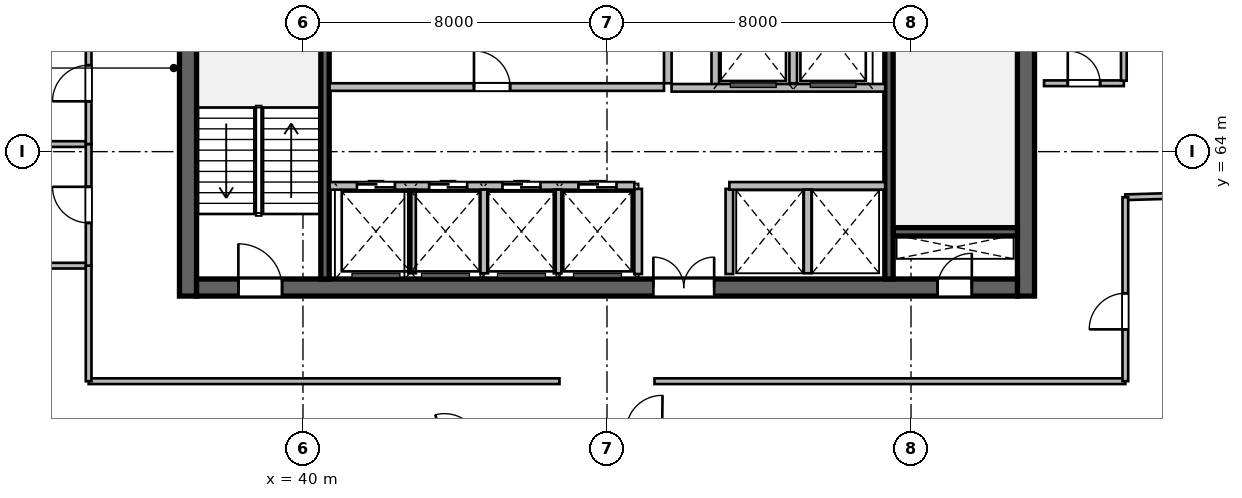
"""IFC4 building model, lengths in metres.
Left out: names, types, materials, properties, quantities, classifications, styles, units other than length and angle.
Written with IfcOpenShell. Run it as: python <this file> out.ifc"""

import sys

from ifc_helpers import new_model, si_unit, direction, frame, frame_2d, origin, place, context, subcontext, project, spatial, rectangle, extrude, source, transform, mapped, element, fill, save


model = new_model("IFC4")
c1 = context("Model", 3, precision=1e-05, world=origin(), true_north=direction((0.0, 1.0)))
c2 = subcontext(c1, "Body", "Model", "MODEL_VIEW")
j1 = project(units=[si_unit("LENGTHUNIT", "METRE"), si_unit("PLANEANGLEUNIT", "RADIAN")], contexts=[c1])
p1 = place(None, origin())
s1 = spatial("IfcSite", under=j1, at=p1, CompositionType="ELEMENT")
p2 = place(p1, origin())
s2 = spatial("IfcBuilding", under=s1, at=p2, CompositionType="ELEMENT")
p3 = place(p2, frame((0.0, 0.0, 239.1)))
s3 = spatial("IfcBuildingStorey", under=s2, at=p3, CompositionType="ELEMENT", Elevation=239.1)
m1 = source(origin(), c2, "Body", "SweptSolid", [
    extrude(rectangle(XDim=12.0, YDim=0.45, at=frame_2d((6.0, 0.0))), origin(), (0.0, 0.0, 1.0), 3.9),
])
for number, where, z_axis, x_axis in (
    (1, (36.975, 60.2, 0.0), (0.0, 0.0, 1.0), (0.0, 1.0, 0.0)),
    (2, (59.025, 60.2, 0.0), (0.0, 0.0, 1.0), (0.0, 1.0, 0.0)),
):
    element("IfcWall", number, at=place(p3, frame(where, z_axis=z_axis, x_axis=x_axis)), inside=s3, PredefinedType="SHEAR", context=c2, shape_type="MappedRepresentation", body=[
        mapped(m1, transform((0.0, 0.0, 0.0), scale=1.0)),
    ])
m2 = source(origin(), c2, "Body", "SweptSolid", [
    extrude(rectangle(XDim=21.6, YDim=0.45, at=frame_2d((10.8, 0.0))), origin(), (0.0, 0.0, 1.0), 3.9),
])
p4 = place(p3, frame((37.2, 60.425, 0.0), z_axis=(0.0, 0.0, 1.0), x_axis=(1.0, 0.0, 0.0)))
e3 = element("IfcWall", 3, at=p4, inside=s3, PredefinedType="SHEAR", context=c2, shape_type="MappedRepresentation", body=[
    mapped(m2, transform((0.0, 0.0, 0.0), scale=1.0)),
])
p5 = place(p4, frame((1.1, 0.0, 0.0)))
e4 = element("IfcOpeningElement", 4, at=p5, cuts=e3, PredefinedType="OPENING", context=c2, shape_type="SweptSolid", body=[
    extrude(rectangle(XDim=1.15, YDim=2.15, at=frame_2d((0.575, 1.075))), frame((0.0, 0.235, 0.0), z_axis=(0.0, -1.0, 0.0), x_axis=(1.0, 0.0, 0.0)), (0.0, 0.0, 1.0), 0.47),
])
p6 = place(p4, frame((19.5, 0.0, 0.0)))
e5 = element("IfcOpeningElement", 5, at=p6, cuts=e3, PredefinedType="OPENING", context=c2, shape_type="SweptSolid", body=[
    extrude(rectangle(XDim=0.9, YDim=2.1, at=frame_2d((0.45, 1.05))), frame((0.0, 0.235, 0.0), z_axis=(0.0, -1.0, 0.0), x_axis=(1.0, 0.0, 0.0)), (0.0, 0.0, 1.0), 0.47),
])
p7 = place(p4, frame((12.02, 0.0, 0.0)))
e6 = element("IfcOpeningElement", 6, at=p7, cuts=e3, PredefinedType="OPENING", context=c2, shape_type="SweptSolid", body=[
    extrude(rectangle(XDim=1.6, YDim=2.15, at=frame_2d((0.8, 1.075))), frame((0.0, 0.235, 0.0), z_axis=(0.0, -1.0, 0.0), x_axis=(1.0, 0.0, 0.0)), (0.0, 0.0, 1.0), 0.47),
])
m3 = source(origin(), c2, "Body", "SweptSolid", [
    extrude(rectangle(XDim=3.27, YDim=0.22, at=frame_2d((1.635, 0.0))), origin(), (0.0, 0.0, 1.0), 3.9),
])
p8 = place(p3, frame((55.53, 61.89, 0.0), z_axis=(0.0, 0.0, 1.0), x_axis=(1.0, 0.0, 0.0)))
e7 = element("IfcWall", 7, at=p8, inside=s3, PredefinedType="SHEAR", context=c2, shape_type="MappedRepresentation", body=[
    mapped(m3, transform((0.0, 0.0, 0.0), scale=1.0)),
])
m4 = source(origin(), c2, "Body", "SweptSolid", [
    extrude(rectangle(XDim=11.1, YDim=0.22, at=frame_2d((5.55, 0.0))), origin(), (0.0, 0.0, 1.0), 3.9),
])
p9 = place(p3, frame((40.58, 60.65, 0.0), z_axis=(0.0, 0.0, 1.0), x_axis=(0.0, 1.0, 0.0)))
e8 = element("IfcWall", 8, at=p9, inside=s3, PredefinedType="SHEAR", context=c2, shape_type="MappedRepresentation", body=[
    mapped(m4, transform((0.0, 0.0, 0.0), scale=1.0)),
])
p10 = place(p3, frame((55.42, 60.65, 0.0), z_axis=(0.0, 0.0, 1.0), x_axis=(0.0, 1.0, 0.0)))
e9 = element("IfcWall", 9, at=p10, inside=s3, PredefinedType="SHEAR", context=c2, shape_type="MappedRepresentation", body=[
    mapped(m4, transform((0.0, 0.0, 0.0), scale=1.0)),
])
p11 = place(p10, frame((9.595, 0.0, 0.0)))
e10 = element("IfcOpeningElement", 10, at=p11, cuts=e9, PredefinedType="OPENING", context=c2, shape_type="SweptSolid", body=[
    extrude(rectangle(XDim=1.15, YDim=2.15, at=frame_2d((0.575, 1.075))), frame((0.0, 0.12, 0.0), z_axis=(0.0, -1.0, 0.0), x_axis=(1.0, 0.0, 0.0)), (0.0, 0.0, 1.0), 0.24),
])
m5 = source(origin(), c2, "Body", "SweptSolid", [
    extrude(rectangle(XDim=2.24, YDim=0.2, at=frame_2d((1.12, 0.0))), origin(), (0.0, 0.0, 1.0), 3.65),
])
for number, where, z_axis, x_axis in (
    (11, (48.82, 60.78, 0.0), (0.0, 0.0, 1.0), (0.0, 1.0, 0.0)),
    (12, (51.22, 60.78, 0.0), (0.0, 0.0, 1.0), (0.0, 1.0, 0.0)),
):
    element("IfcWall", number, at=place(p3, frame(where, z_axis=z_axis, x_axis=x_axis)), inside=s3, PredefinedType="SOLIDWALL", context=c2, shape_type="MappedRepresentation", body=[
        mapped(m5, transform((0.0, 0.0, 0.0), scale=1.0)),
    ])
m6 = source(origin(), c2, "Body", "SweptSolid", [
    extrude(rectangle(XDim=5.8, YDim=0.2, at=frame_2d((2.9, 0.0))), origin(), (0.0, 0.0, 1.0), 3.65),
])
p12 = place(p3, frame((49.6, 65.8, 0.0), z_axis=(0.0, 0.0, 1.0), x_axis=(0.0, 1.0, 0.0)))
e13 = element("IfcWall", 13, at=p12, inside=s3, PredefinedType="SOLIDWALL", context=c2, shape_type="MappedRepresentation", body=[
    mapped(m6, transform((0.0, 0.0, 0.0), scale=1.0)),
])
m7 = source(origin(), c2, "Body", "SweptSolid", [
    extrude(rectangle(XDim=2.58, YDim=0.2, at=frame_2d((1.29, 0.0))), origin(), (0.0, 0.0, 1.0), 3.65),
])
p13 = place(p3, frame((50.85, 65.68, 0.0), z_axis=(0.0, 0.0, 1.0), x_axis=(0.0, 1.0, 0.0)))
e14 = element("IfcWall", 14, at=p13, inside=s3, PredefinedType="SOLIDWALL", context=c2, shape_type="MappedRepresentation", body=[
    mapped(m7, transform((0.0, 0.0, 0.0), scale=1.0)),
])
m8 = source(origin(), c2, "Body", "SweptSolid", [
    extrude(rectangle(XDim=2.4, YDim=0.2, at=frame_2d((1.2, 0.0))), origin(), (0.0, 0.0, 1.0), 3.65),
])
p14 = place(p3, frame((52.9, 65.8, 0.0), z_axis=(0.0, 0.0, 1.0), x_axis=(0.0, 1.0, 0.0)))
e15 = element("IfcWall", 15, at=p14, inside=s3, PredefinedType="SOLIDWALL", context=c2, shape_type="MappedRepresentation", body=[
    mapped(m8, transform((0.0, 0.0, 0.0), scale=1.0)),
])
m9 = source(origin(), c2, "Body", "SweptSolid", [
    extrude(rectangle(XDim=5.62, YDim=0.2, at=frame_2d((2.81, 0.0))), origin(), (0.0, 0.0, 1.0), 3.65),
])
p15 = place(p3, frame((49.7, 65.68, 0.0), z_axis=(0.0, 0.0, 1.0), x_axis=(1.0, 0.0, 0.0)))
e16 = element("IfcWall", 16, at=p15, inside=s3, PredefinedType="SOLIDWALL", context=c2, shape_type="MappedRepresentation", body=[
    mapped(m9, transform((0.0, 0.0, 0.0), scale=1.0)),
])
m10 = source(origin(), c2, "Body", "SweptSolid", [
    extrude(rectangle(XDim=8.02, YDim=0.2, at=frame_2d((4.01, 0.0))), origin(), (0.0, 0.0, 1.0), 3.65),
])
p16 = place(p3, frame((40.7, 63.1, 0.0), z_axis=(0.0, 0.0, 1.0), x_axis=(1.0, 0.0, 0.0)))
e17 = element("IfcWall", 17, at=p16, inside=s3, PredefinedType="SOLIDWALL", context=c2, shape_type="MappedRepresentation", body=[
    mapped(m10, transform((0.0, 0.0, 0.0), scale=1.0)),
])
p17 = place(p16, frame((0.72, 0.0, 0.0)))
e18 = element("IfcOpeningElement", 18, at=p17, cuts=e17, PredefinedType="OPENING", context=c2, shape_type="SweptSolid", body=[
    extrude(rectangle(XDim=1.0, YDim=2.15, at=frame_2d((0.5, 1.075))), frame((0.0, 0.11, 0.0), z_axis=(0.0, -1.0, 0.0), x_axis=(1.0, 0.0, 0.0)), (0.0, 0.0, 1.0), 0.22),
])
p18 = place(p16, frame((2.62, 0.0, 0.0)))
e19 = element("IfcOpeningElement", 19, at=p18, cuts=e17, PredefinedType="OPENING", context=c2, shape_type="SweptSolid", body=[
    extrude(rectangle(XDim=1.0, YDim=2.15, at=frame_2d((0.5, 1.075))), frame((0.0, 0.11, 0.0), z_axis=(0.0, -1.0, 0.0), x_axis=(1.0, 0.0, 0.0)), (0.0, 0.0, 1.0), 0.22),
])
p19 = place(p16, frame((4.55, 0.0, 0.0)))
e20 = element("IfcOpeningElement", 20, at=p19, cuts=e17, PredefinedType="OPENING", context=c2, shape_type="SweptSolid", body=[
    extrude(rectangle(XDim=1.0, YDim=2.15, at=frame_2d((0.5, 1.075))), frame((0.0, 0.11, 0.0), z_axis=(0.0, -1.0, 0.0), x_axis=(1.0, 0.0, 0.0)), (0.0, 0.0, 1.0), 0.22),
])
p20 = place(p16, frame((6.55, 0.0, 0.0)))
e21 = element("IfcOpeningElement", 21, at=p20, cuts=e17, PredefinedType="OPENING", context=c2, shape_type="SweptSolid", body=[
    extrude(rectangle(XDim=1.0, YDim=2.15, at=frame_2d((0.5, 1.075))), frame((0.0, 0.11, 0.0), z_axis=(0.0, -1.0, 0.0), x_axis=(1.0, 0.0, 0.0)), (0.0, 0.0, 1.0), 0.22),
])
m11 = source(origin(), c2, "Body", "SweptSolid", [
    extrude(rectangle(XDim=4.1, YDim=0.2, at=frame_2d((2.05, 0.0))), origin(), (0.0, 0.0, 1.0), 3.65),
])
p21 = place(p3, frame((51.22, 63.1, 0.0), z_axis=(0.0, 0.0, 1.0), x_axis=(1.0, 0.0, 0.0)))
e22 = element("IfcWall", 22, at=p21, inside=s3, PredefinedType="SOLIDWALL", context=c2, shape_type="MappedRepresentation", body=[
    mapped(m11, transform((0.0, 0.0, 0.0), scale=1.0)),
])
m12 = source(origin(), c2, "Body", "SweptSolid", [
    extrude(rectangle(XDim=2.2, YDim=0.2, at=frame_2d((1.1, 0.0))), origin(), (0.0, 0.0, 1.0), 3.65),
])
for number, where, z_axis, x_axis in (
    (23, (42.87, 60.8, 0.0), (0.0, 0.0, 1.0), (0.0, 1.0, 0.0)),
    (24, (44.77, 60.8, 0.0), (0.0, 0.0, 1.0), (0.0, 1.0, 0.0)),
    (25, (46.7, 60.8, 0.0), (0.0, 0.0, 1.0), (0.0, 1.0, 0.0)),
    (26, (53.28, 60.8, 0.0), (0.0, 0.0, 1.0), (0.0, 1.0, 0.0)),
):
    element("IfcWall", number, at=place(p3, frame(where, z_axis=z_axis, x_axis=x_axis)), inside=s3, PredefinedType="SOLIDWALL", context=c2, shape_type="MappedRepresentation", body=[
        mapped(m12, transform((0.0, 0.0, 0.0), scale=1.0)),
    ])
m13 = source(origin(), c2, "Body", "SweptSolid", [
    extrude(rectangle(XDim=8.8, YDim=0.2, at=frame_2d((4.4, 0.0))), origin(), (0.0, 0.0, 1.0), 3.65),
])
p22 = place(p3, frame((40.7, 65.7, 0.0), z_axis=(0.0, 0.0, 1.0), x_axis=(1.0, 0.0, 0.0)))
e27 = element("IfcWall", 27, at=p22, inside=s3, PredefinedType="SOLIDWALL", context=c2, shape_type="MappedRepresentation", body=[
    mapped(m13, transform((0.0, 0.0, 0.0), scale=1.0)),
])
p23 = place(p22, frame((3.8, 0.0, 0.0)))
e28 = element("IfcOpeningElement", 28, at=p23, cuts=e27, PredefinedType="OPENING", context=c2, shape_type="SweptSolid", body=[
    extrude(rectangle(XDim=0.95, YDim=2.15, at=frame_2d((0.475, 1.075))), frame((0.0, 0.11, 0.0), z_axis=(0.0, -1.0, 0.0), x_axis=(1.0, 0.0, 0.0)), (0.0, 0.0, 1.0), 0.22),
])
m14 = source(origin(), c2, "Body", "SweptSolid", [
    extrude(rectangle(XDim=2.1, YDim=0.15, at=frame_2d((1.05, 0.0))), origin(), (0.0, 0.0, 1.0), 3.65),
])
p24 = place(p3, frame((59.5, 65.8, 0.0), z_axis=(0.0, 0.0, 1.0), x_axis=(1.0, 0.0, 0.0)))
e29 = element("IfcWall", 29, at=p24, inside=s3, PredefinedType="PARTITIONING", context=c2, shape_type="MappedRepresentation", body=[
    mapped(m14, transform((0.0, 0.0, 0.0), scale=1.0)),
])
p25 = place(p24, frame((0.625, 0.0, 0.0)))
e30 = element("IfcOpeningElement", 30, at=p25, cuts=e29, PredefinedType="OPENING", context=c2, shape_type="SweptSolid", body=[
    extrude(rectangle(XDim=0.85, YDim=2.1, at=frame_2d((0.425, 1.05))), frame((0.0, 0.085, 0.0), z_axis=(0.0, -1.0, 0.0), x_axis=(1.0, 0.0, 0.0)), (0.0, 0.0, 1.0), 0.17),
])
m15 = source(origin(), c2, "Body", "SweptSolid", [
    extrude(rectangle(XDim=3.565, YDim=0.15, at=frame_2d((1.783, 0.0))), origin(), (0.0, 0.0, 1.0), 3.65),
])
p26 = place(p3, frame((61.6, 65.867, 0.0), z_axis=(0.0, 0.0, 1.0), x_axis=(0.0, 1.0, 0.0)))
e31 = element("IfcWall", 31, at=p26, inside=s3, PredefinedType="PARTITIONING", context=c2, shape_type="MappedRepresentation", body=[
    mapped(m15, transform((0.0, 0.0, 0.0), scale=1.0)),
])
p27 = place(p26, frame((0.88, 0.0, 0.0)))
e32 = element("IfcOpeningElement", 32, at=p27, cuts=e31, PredefinedType="OPENING", context=c2, shape_type="SweptSolid", body=[
    extrude(rectangle(XDim=0.95, YDim=2.1, at=frame_2d((0.475, 1.05))), frame((0.0, 0.085, 0.0), z_axis=(0.0, -1.0, 0.0), x_axis=(1.0, 0.0, 0.0)), (0.0, 0.0, 1.0), 0.17),
])
m16 = source(origin(), c2, "Body", "SweptSolid", [
    extrude(rectangle(XDim=12.39, YDim=0.15, at=frame_2d((6.195, 0.0))), origin(), (0.0, 0.0, 1.0), 3.65),
])
for number, where, z_axis, x_axis in (
    (33, (34.36, 57.96, 0.0), (0.0, 0.0, 1.0), (1.0, 0.0, 0.0)),
    (34, (49.25, 57.96, 0.0), (0.0, 0.0, 1.0), (1.0, 0.0, 0.0)),
):
    element("IfcWall", number, at=place(p3, frame(where, z_axis=z_axis, x_axis=x_axis)), inside=s3, PredefinedType="PARTITIONING", context=c2, shape_type="MappedRepresentation", body=[
        mapped(m16, transform((0.0, 0.0, 0.0), scale=1.0)),
    ])
m17 = source(origin(), c2, "Body", "SweptSolid", [
    extrude(rectangle(XDim=17.879, YDim=0.15, at=frame_2d((8.939, 0.0))), origin(), (0.0, 0.0, 1.0), 3.65),
])
p28 = place(p3, frame((16.481, 61.0, 0.0), z_axis=(0.0, 0.0, 1.0), x_axis=(1.0, 0.0, 0.0)))
e35 = element("IfcWall", 35, at=p28, inside=s3, PredefinedType="PARTITIONING", context=c2, shape_type="MappedRepresentation", body=[
    mapped(m17, transform((0.0, 0.0, 0.0), scale=1.0)),
])
m18 = source(origin(), c2, "Body", "SweptSolid", [
    extrude(rectangle(XDim=3.04, YDim=0.15, at=frame_2d((1.52, 0.0))), origin(), (0.0, 0.0, 1.0), 3.65),
])
p29 = place(p3, frame((34.36, 57.96, 0.0), z_axis=(0.0, 0.0, 1.0), x_axis=(0.0, 1.0, 0.0)))
e36 = element("IfcWall", 36, at=p29, inside=s3, PredefinedType="PARTITIONING", context=c2, shape_type="MappedRepresentation", body=[
    mapped(m18, transform((0.0, 0.0, 0.0), scale=1.0)),
])
m19 = source(origin(), c2, "Body", "SweptSolid", [
    extrude(rectangle(XDim=15.501, YDim=0.15, at=frame_2d((7.751, 0.0))), origin(), (0.0, 0.0, 1.0), 3.65),
])
p30 = place(p3, frame((18.859, 64.2, 0.0), z_axis=(0.0, 0.0, 1.0), x_axis=(1.0, 0.0, 0.0)))
e37 = element("IfcWall", 37, at=p30, inside=s3, PredefinedType="PARTITIONING", context=c2, shape_type="MappedRepresentation", body=[
    mapped(m19, transform((0.0, 0.0, 0.0), scale=1.0)),
])
m20 = source(origin(), c2, "Body", "SweptSolid", [
    extrude(rectangle(XDim=3.2, YDim=0.15, at=frame_2d((1.6, 0.0))), origin(), (0.0, 0.0, 1.0), 3.65),
])
p31 = place(p3, frame((34.36, 61.0, 0.0), z_axis=(0.0, 0.0, 1.0), x_axis=(0.0, 1.0, 0.0)))
e38 = element("IfcWall", 38, at=p31, inside=s3, PredefinedType="PARTITIONING", context=c2, shape_type="MappedRepresentation", body=[
    mapped(m20, transform((0.0, 0.0, 0.0), scale=1.0)),
])
p32 = place(p31, frame((1.125, 0.0, 0.0)))
e39 = element("IfcOpeningElement", 39, at=p32, cuts=e38, PredefinedType="OPENING", context=c2, shape_type="SweptSolid", body=[
    extrude(rectangle(XDim=0.95, YDim=2.1, at=frame_2d((0.475, 1.05))), frame((0.0, 0.085, 0.0), z_axis=(0.0, -1.0, 0.0), x_axis=(1.0, 0.0, 0.0)), (0.0, 0.0, 1.0), 0.17),
])
p33 = place(p3, frame((34.36, 64.2, 0.0), z_axis=(0.0, 0.0, 1.0), x_axis=(0.0, 1.0, 0.0)))
e40 = element("IfcWall", 40, at=p33, inside=s3, PredefinedType="PARTITIONING", context=c2, shape_type="MappedRepresentation", body=[
    mapped(m20, transform((0.0, 0.0, 0.0), scale=1.0)),
])
p34 = place(p33, frame((1.125, 0.0, 0.0)))
e41 = element("IfcOpeningElement", 41, at=p34, cuts=e40, PredefinedType="OPENING", context=c2, shape_type="SweptSolid", body=[
    extrude(rectangle(XDim=0.95, YDim=2.1, at=frame_2d((0.475, 1.05))), frame((0.0, 0.085, 0.0), z_axis=(0.0, -1.0, 0.0), x_axis=(1.0, 0.0, 0.0)), (0.0, 0.0, 1.0), 0.17),
])
m21 = source(origin(), c2, "Body", "SweptSolid", [
    extrude(rectangle(XDim=13.315, YDim=0.15, at=frame_2d((6.657, 0.0))), origin(), (0.0, 0.0, 1.0), 3.65),
])
p35 = place(p3, frame((61.64, 62.8, 0.0), z_axis=(0.0, 0.0, 1.0), x_axis=(0.999574400598, 0.029172207124, 0.0)))
e42 = element("IfcWall", 42, at=p35, inside=s3, PredefinedType="PARTITIONING", context=c2, shape_type="MappedRepresentation", body=[
    mapped(m21, transform((0.0, 0.0, 0.0), scale=1.0)),
])
m22 = source(origin(), c2, "Body", "SweptSolid", [
    extrude(rectangle(XDim=4.84, YDim=0.15, at=frame_2d((2.42, 0.0))), origin(), (0.0, 0.0, 1.0), 3.65),
])
p36 = place(p3, frame((61.64, 57.96, 0.0), z_axis=(0.0, 0.0, 1.0), x_axis=(0.0, 1.0, 0.0)))
e43 = element("IfcWall", 43, at=p36, inside=s3, PredefinedType="PARTITIONING", context=c2, shape_type="MappedRepresentation", body=[
    mapped(m22, transform((0.0, 0.0, 0.0), scale=1.0)),
])
p37 = place(p36, frame((1.364, 0.0, 0.0)))
e44 = element("IfcOpeningElement", 44, at=p37, cuts=e43, PredefinedType="OPENING", context=c2, shape_type="SweptSolid", body=[
    extrude(rectangle(XDim=0.95, YDim=2.1, at=frame_2d((0.475, 1.05))), frame((0.0, 0.085, 0.0), z_axis=(0.0, -1.0, 0.0), x_axis=(1.0, 0.0, 0.0)), (0.0, 0.0, 1.0), 0.17),
])
m23 = source(origin(), c2, "Body", "SweptSolid", [
    extrude(rectangle(XDim=1.15, YDim=2.15, at=frame_2d((0.575, 1.075))), frame((0.0, 0.025, 0.0), z_axis=(0.0, -1.0, 0.0), x_axis=(1.0, 0.0, 0.0)), (0.0, 0.0, 1.0), 0.05),
])
p38 = place(p5, origin())
e45 = element("IfcDoor", 45, at=p38, inside=s3, OperationType="SINGLE_SWING_LEFT", PredefinedType="DOOR", context=c2, shape_type="MappedRepresentation", body=[
    mapped(m23, transform((0.0, 0.0, 0.0), scale=1.0)),
])
fill(e4, e45)
m24 = source(origin(), c2, "Body", "SweptSolid", [
    extrude(rectangle(XDim=0.9, YDim=2.1, at=frame_2d((0.45, 1.05))), frame((0.0, 0.025, 0.0), z_axis=(0.0, -1.0, 0.0), x_axis=(1.0, 0.0, 0.0)), (0.0, 0.0, 1.0), 0.05),
])
p39 = place(p6, origin())
e46 = element("IfcDoor", 46, at=p39, inside=s3, OperationType="SINGLE_SWING_RIGHT", PredefinedType="DOOR", context=c2, shape_type="MappedRepresentation", body=[
    mapped(m24, transform((0.0, 0.0, 0.0), scale=1.0)),
])
fill(e5, e46)
m25 = source(origin(), c2, "Body", "SweptSolid", [
    extrude(rectangle(XDim=1.6, YDim=2.15, at=frame_2d((0.8, 1.075))), frame((0.0, 0.025, 0.0), z_axis=(0.0, -1.0, 0.0), x_axis=(1.0, 0.0, 0.0)), (0.0, 0.0, 1.0), 0.05),
])
p40 = place(p7, origin())
e47 = element("IfcDoor", 47, at=p40, inside=s3, OperationType="DOUBLE_DOOR_SINGLE_SWING", PredefinedType="DOOR", context=c2, shape_type="MappedRepresentation", body=[
    mapped(m25, transform((0.0, 0.0, 0.0), scale=1.0)),
])
fill(e6, e47)
m26 = source(origin(), c2, "Body", "SweptSolid", [
    extrude(rectangle(XDim=1.0, YDim=2.15, at=frame_2d((0.5, 1.075))), frame((0.0, 0.025, 0.0), z_axis=(0.0, -1.0, 0.0), x_axis=(1.0, 0.0, 0.0)), (0.0, 0.0, 1.0), 0.05),
])
p41 = place(p17, origin())
e48 = element("IfcDoor", 48, at=p41, inside=s3, OperationType="DOUBLE_DOOR_SLIDING", PredefinedType="DOOR", context=c2, shape_type="MappedRepresentation", body=[
    mapped(m26, transform((0.0, 0.0, 0.0), scale=1.0)),
])
fill(e18, e48)
p42 = place(p18, origin())
e49 = element("IfcDoor", 49, at=p42, inside=s3, OperationType="DOUBLE_DOOR_SLIDING", PredefinedType="DOOR", context=c2, shape_type="MappedRepresentation", body=[
    mapped(m26, transform((0.0, 0.0, 0.0), scale=1.0)),
])
fill(e19, e49)
p43 = place(p19, origin())
e50 = element("IfcDoor", 50, at=p43, inside=s3, OperationType="DOUBLE_DOOR_SLIDING", PredefinedType="DOOR", context=c2, shape_type="MappedRepresentation", body=[
    mapped(m26, transform((0.0, 0.0, 0.0), scale=1.0)),
])
fill(e20, e50)
p44 = place(p20, origin())
e51 = element("IfcDoor", 51, at=p44, inside=s3, OperationType="DOUBLE_DOOR_SLIDING", PredefinedType="DOOR", context=c2, shape_type="MappedRepresentation", body=[
    mapped(m26, transform((0.0, 0.0, 0.0), scale=1.0)),
])
fill(e21, e51)
m27 = source(origin(), c2, "Body", "SweptSolid", [
    extrude(rectangle(XDim=0.95, YDim=2.15, at=frame_2d((0.475, 1.075))), frame((0.0, 0.025, 0.0), z_axis=(0.0, -1.0, 0.0), x_axis=(1.0, 0.0, 0.0)), (0.0, 0.0, 1.0), 0.05),
])
p45 = place(p23, origin())
e52 = element("IfcDoor", 52, at=p45, inside=s3, OperationType="SINGLE_SWING_LEFT", PredefinedType="DOOR", context=c2, shape_type="MappedRepresentation", body=[
    mapped(m27, transform((0.0, 0.0, 0.0), scale=1.0)),
])
fill(e28, e52)
m28 = source(origin(), c2, "Body", "SweptSolid", [
    extrude(rectangle(XDim=0.85, YDim=2.1, at=frame_2d((0.425, 1.05))), frame((0.0, 0.025, 0.0), z_axis=(0.0, -1.0, 0.0), x_axis=(1.0, 0.0, 0.0)), (0.0, 0.0, 1.0), 0.05),
])
p46 = place(p25, origin())
e53 = element("IfcDoor", 53, at=p46, inside=s3, OperationType="SINGLE_SWING_LEFT", PredefinedType="DOOR", context=c2, shape_type="MappedRepresentation", body=[
    mapped(m28, transform((0.0, 0.0, 0.0), scale=1.0)),
])
fill(e30, e53)
m29 = source(origin(), c2, "Body", "SweptSolid", [
    extrude(rectangle(XDim=0.95, YDim=2.1, at=frame_2d((0.475, 1.05))), frame((0.0, 0.025, 0.0), z_axis=(0.0, -1.0, 0.0), x_axis=(1.0, 0.0, 0.0)), (0.0, 0.0, 1.0), 0.05),
])
p47 = place(p32, origin())
e54 = element("IfcDoor", 54, at=p47, inside=s3, OperationType="SINGLE_SWING_RIGHT", PredefinedType="DOOR", context=c2, shape_type="MappedRepresentation", body=[
    mapped(m29, transform((0.0, 0.0, 0.0), scale=1.0)),
])
fill(e39, e54)
p48 = place(p34, origin())
e55 = element("IfcDoor", 55, at=p48, inside=s3, OperationType="SINGLE_SWING_LEFT", PredefinedType="DOOR", context=c2, shape_type="MappedRepresentation", body=[
    mapped(m29, transform((0.0, 0.0, 0.0), scale=1.0)),
])
fill(e41, e55)
p49 = place(p37, origin())
e56 = element("IfcDoor", 56, at=p49, inside=s3, OperationType="SINGLE_SWING_LEFT", PredefinedType="DOOR", context=c2, shape_type="MappedRepresentation", body=[
    mapped(m29, transform((0.0, 0.0, 0.0), scale=1.0)),
])
fill(e44, e56)
save(model, sys.argv[1])
